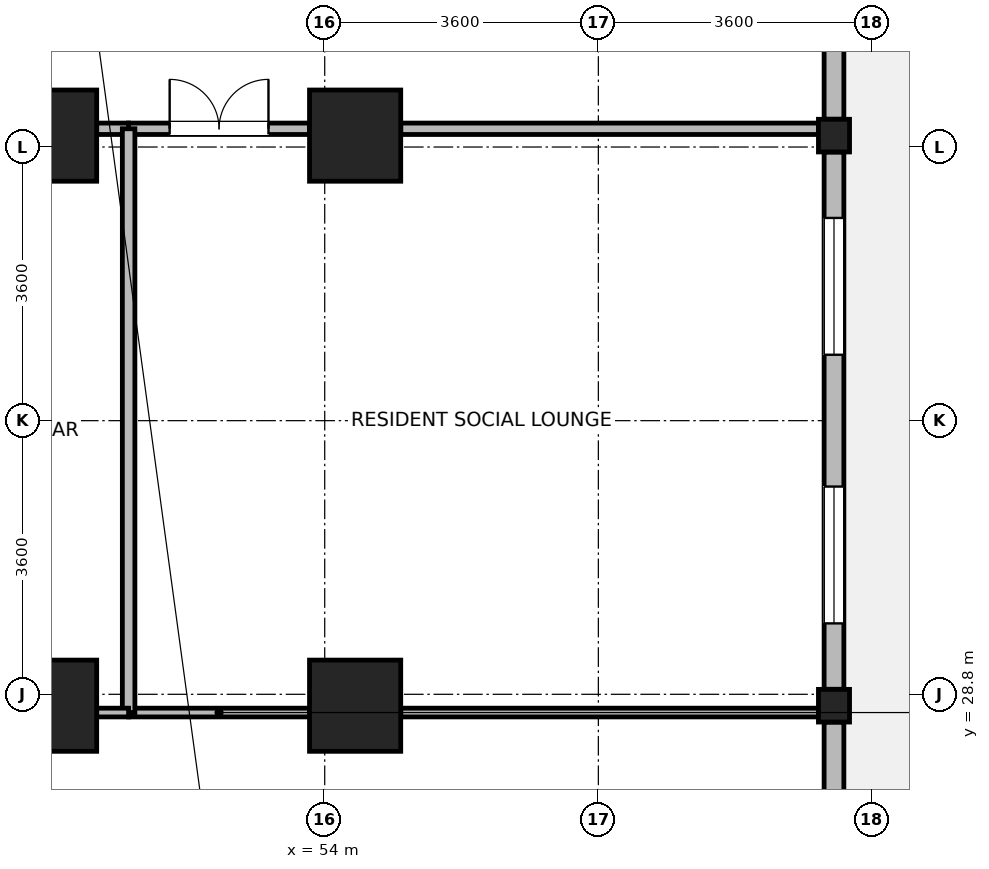
"""IFC4 building model, lengths in metres.
Left out: names, types, materials, properties, quantities, classifications, styles, units other than length and angle.
Written with IfcOpenShell. Run it as: python <this file> out.ifc"""

import sys

from ifc_helpers import new_model, si_unit, direction, frame, frame_2d, origin, origin_2d, place, context, subcontext, project, spatial, rectangle, i_section, extrude, source, transform, mapped, element, fill, save


model = new_model("IFC4")
c1 = context("Model", 3, precision=1e-05, world=origin(), true_north=direction((0.0, 1.0)))
c2 = subcontext(c1, "Body", "Model", "MODEL_VIEW")
j1 = project(units=[si_unit("LENGTHUNIT", "METRE"), si_unit("PLANEANGLEUNIT", "RADIAN")], contexts=[c1])
p1 = place(None, origin())
s1 = spatial("IfcSite", under=j1, at=p1, CompositionType="ELEMENT")
p2 = place(p1, origin())
s2 = spatial("IfcBuilding", under=s1, at=p2, CompositionType="ELEMENT")
p3 = place(p2, frame((0.0, 0.0, 78.6)))
s3 = spatial("IfcBuildingStorey", under=s2, at=p3, CompositionType="ELEMENT", Elevation=78.6)
m1 = source(origin(), c2, "Body", "SweptSolid", [
    extrude(rectangle(XDim=1.2, YDim=1.2, at=origin_2d()), origin(), (0.0, 0.0, 1.0), 3.7),
])
for number, where, z_axis, x_axis in (
    (1, (50.4, 28.65, 0.0), (0.0, 0.0, 1.0), (1.0, 0.0, 0.0)),
    (2, (50.4, 36.15, 0.0), (0.0, 0.0, 1.0), (1.0, 0.0, 0.0)),
    (3, (54.4, 28.65, 0.0), (0.0, 0.0, 1.0), (1.0, 0.0, 0.0)),
    (4, (54.4, 36.15, 0.0), (0.0, 0.0, 1.0), (1.0, 0.0, 0.0)),
):
    element("IfcColumn", number, at=place(p3, frame(where, z_axis=z_axis, x_axis=x_axis)), inside=s3, PredefinedType="COLUMN", context=c2, shape_type="MappedRepresentation", body=[
        mapped(m1, transform((0.0, 0.0, 0.0), x_axis=(1.0, 0.0, 0.0), y_axis=(0.0, 1.0, 0.0), z_axis=(0.0, 0.0, 1.0), scale=1.0)),
    ])
m2 = source(origin(), c2, "Body", "SweptSolid", [
    extrude(i_section(OverallWidth=0.409, OverallDepth=0.43, WebThickness=0.024, FlangeThickness=0.033, FilletRadius=0.015, at=origin_2d()), origin(), (0.0, 0.0, 1.0), 3.7),
])
for number, where, z_axis, x_axis in (
    (5, (60.7, 28.65, 0.0), (0.0, 0.0, 1.0), (1.0, 0.0, 0.0)),
    (6, (60.7, 36.15, 0.0), (0.0, 0.0, 1.0), (1.0, 0.0, 0.0)),
):
    element("IfcColumn", number, at=place(p3, frame(where, z_axis=z_axis, x_axis=x_axis)), inside=s3, PredefinedType="COLUMN", context=c2, shape_type="MappedRepresentation", body=[
        mapped(m2, transform((0.0, 0.0, 0.0), x_axis=(1.0, 0.0, 0.0), y_axis=(0.0, 1.0, 0.0), z_axis=(0.0, 0.0, 1.0), scale=1.0)),
    ])
p4 = place(p3, frame((60.7, 28.434, 0.0), z_axis=(0.0, 0.0, 1.0), x_axis=(0.0, -1.0, 0.0)))
e7 = element("IfcWall", 7, at=p4, inside=s3, PredefinedType="STANDARD", context=c2, shape_type="SweptSolid", body=[
    extrude(rectangle(XDim=6.618, YDim=0.26, at=frame_2d((3.309, 0.0))), origin(), (0.0, 0.0, 1.0), 2.93),
])
p5 = place(p4, frame((4.063, 0.0, 0.85)))
e8 = element("IfcOpeningElement", 8, at=p5, cuts=e7, PredefinedType="OPENING", context=c2, shape_type="SweptSolid", body=[
    extrude(rectangle(XDim=1.8, YDim=1.85, at=frame_2d((0.9, 0.925))), frame((0.0, 0.14, 0.0), z_axis=(0.0, -1.0, 0.0), x_axis=(1.0, 0.0, 0.0)), (0.0, 0.0, 1.0), 0.28),
])
p6 = place(p4, frame((2.305, 0.0, 0.85)))
e9 = element("IfcOpeningElement", 9, at=p6, cuts=e7, PredefinedType="OPENING", context=c2, shape_type="SweptSolid", body=[
    extrude(rectangle(XDim=0.95, YDim=1.75, at=frame_2d((0.475, 0.875))), frame((0.0, 0.14, 0.0), z_axis=(0.0, -1.0, 0.0), x_axis=(1.0, 0.0, 0.0)), (0.0, 0.0, 1.0), 0.28),
])
p7 = place(p3, frame((60.7, 35.934, 0.0), z_axis=(0.0, 0.0, 1.0), x_axis=(0.0, -1.0, 0.0)))
e10 = element("IfcWall", 10, at=p7, inside=s3, PredefinedType="STANDARD", context=c2, shape_type="SweptSolid", body=[
    extrude(rectangle(XDim=7.068, YDim=0.26, at=frame_2d((3.534, 0.0))), origin(), (0.0, 0.0, 1.0), 2.93),
])
p8 = place(p7, frame((0.867, 0.0, 0.85)))
e11 = element("IfcOpeningElement", 11, at=p8, cuts=e10, PredefinedType="OPENING", context=c2, shape_type="SweptSolid", body=[
    extrude(rectangle(XDim=1.8, YDim=1.85, at=frame_2d((0.9, 0.925))), frame((0.0, 0.14, 0.0), z_axis=(0.0, -1.0, 0.0), x_axis=(1.0, 0.0, 0.0)), (0.0, 0.0, 1.0), 0.28),
])
p9 = place(p7, frame((4.401, 0.0, 0.85)))
e12 = element("IfcOpeningElement", 12, at=p9, cuts=e10, PredefinedType="OPENING", context=c2, shape_type="SweptSolid", body=[
    extrude(rectangle(XDim=1.8, YDim=1.85, at=frame_2d((0.9, 0.925))), frame((0.0, 0.14, 0.0), z_axis=(0.0, -1.0, 0.0), x_axis=(1.0, 0.0, 0.0)), (0.0, 0.0, 1.0), 0.28),
])
p10 = place(p3, frame((60.7, 43.33, 0.0), z_axis=(0.0, 0.0, 1.0), x_axis=(0.0, -1.0, 0.0)))
e13 = element("IfcWall", 13, at=p10, inside=s3, PredefinedType="STANDARD", context=c2, shape_type="SweptSolid", body=[
    extrude(rectangle(XDim=6.964, YDim=0.26, at=frame_2d((3.482, 0.0))), origin(), (0.0, 0.0, 1.0), 3.43),
])
p11 = place(p10, frame((0.391, 0.0, 0.85)))
e14 = element("IfcOpeningElement", 14, at=p11, cuts=e13, PredefinedType="OPENING", context=c2, shape_type="SweptSolid", body=[
    extrude(rectangle(XDim=2.7, YDim=2.05, at=frame_2d((1.35, 1.025))), frame((0.0, 0.14, 0.0), z_axis=(0.0, -1.0, 0.0), x_axis=(1.0, 0.0, 0.0)), (0.0, 0.0, 1.0), 0.28),
])
p12 = place(p10, frame((3.564, 0.0, 0.85)))
e15 = element("IfcOpeningElement", 15, at=p12, cuts=e13, PredefinedType="OPENING", context=c2, shape_type="SweptSolid", body=[
    extrude(rectangle(XDim=0.95, YDim=1.75, at=frame_2d((0.475, 0.875))), frame((0.0, 0.14, 0.0), z_axis=(0.0, -1.0, 0.0), x_axis=(1.0, 0.0, 0.0)), (0.0, 0.0, 1.0), 0.28),
])
p13 = place(p3, frame((51.42, 36.24, 0.0), z_axis=(0.0, 0.0, 1.0), x_axis=(1.0, 0.0, 0.0)))
e16 = element("IfcWall", 16, at=p13, inside=s3, PredefinedType="PARTITIONING", context=c2, shape_type="SweptSolid", body=[
    extrude(rectangle(XDim=2.38, YDim=0.15, at=frame_2d((1.19, 0.0))), origin(), (0.0, 0.0, 1.0), 2.78),
])
p14 = place(p13, frame((0.54, 0.0, 0.0)))
e17 = element("IfcOpeningElement", 17, at=p14, cuts=e16, PredefinedType="OPENING", context=c2, shape_type="SweptSolid", body=[
    extrude(rectangle(XDim=1.3, YDim=2.12, at=frame_2d((0.65, 1.06))), frame((0.0, 0.085, 0.0), z_axis=(0.0, -1.0, 0.0), x_axis=(1.0, 0.0, 0.0)), (0.0, 0.0, 1.0), 0.17),
])
p15 = place(p3, frame((55.0, 36.24, 0.0), z_axis=(0.0, 0.0, 1.0), x_axis=(1.0, 0.0, 0.0)))
e18 = element("IfcWall", 18, at=p15, inside=s3, PredefinedType="PARTITIONING", context=c2, shape_type="SweptSolid", body=[
    extrude(rectangle(XDim=5.496, YDim=0.15, at=frame_2d((2.748, 0.0))), origin(), (0.0, 0.0, 1.0), 2.78),
])
p16 = place(p3, frame((51.0, 36.24, 0.0), z_axis=(0.0, 0.0, 1.0), x_axis=(1.0, 0.0, 0.0)))
e19 = element("IfcWall", 19, at=p16, inside=s3, PredefinedType="PARTITIONING", context=c2, shape_type="SweptSolid", body=[
    extrude(rectangle(XDim=0.42, YDim=0.15, at=frame_2d((0.21, 0.0))), origin(), (0.0, 0.0, 1.0), 2.78),
])
p17 = place(p3, frame((51.42, 28.56, 0.0), z_axis=(0.0, 0.0, 1.0), x_axis=(1.0, 0.0, 0.0)))
e20 = element("IfcWall", 20, at=p17, inside=s3, PredefinedType="PARTITIONING", context=c2, shape_type="SweptSolid", body=[
    extrude(rectangle(XDim=2.38, YDim=0.115, at=frame_2d((1.19, 0.0))), origin(), (0.0, 0.0, 1.0), 2.78),
])
p18 = place(p3, frame((55.0, 28.56, 0.0), z_axis=(0.0, 0.0, 1.0), x_axis=(1.0, 0.0, 0.0)))
e21 = element("IfcWall", 21, at=p18, inside=s3, PredefinedType="PARTITIONING", context=c2, shape_type="SweptSolid", body=[
    extrude(rectangle(XDim=5.496, YDim=0.115, at=frame_2d((2.748, 0.0))), origin(), (0.0, 0.0, 1.0), 2.78),
])
p19 = place(p3, frame((51.42, 28.56, 0.0), z_axis=(0.0, 0.0, 1.0), x_axis=(0.0, 1.0, 0.0)))
e22 = element("IfcWall", 22, at=p19, inside=s3, PredefinedType="PARTITIONING", context=c2, shape_type="SweptSolid", body=[
    extrude(rectangle(XDim=7.68, YDim=0.165, at=frame_2d((3.84, 0.0))), origin(), (0.0, 0.0, 1.0), 3.43),
])
p20 = place(p3, frame((51.0, 28.56, 0.0), z_axis=(0.0, 0.0, 1.0), x_axis=(1.0, 0.0, 0.0)))
e23 = element("IfcWall", 23, at=p20, inside=s3, PredefinedType="PARTITIONING", context=c2, shape_type="SweptSolid", body=[
    extrude(rectangle(XDim=0.42, YDim=0.115, at=frame_2d((0.21, 0.0))), origin(), (0.0, 0.0, 1.0), 2.78),
])
p21 = place(p8, origin())
e24 = element("IfcWindow", 24, at=p21, inside=s3, PartitioningType="SINGLE_PANEL", PredefinedType="WINDOW", context=c2, shape_type="SweptSolid", body=[
    extrude(rectangle(XDim=1.8, YDim=1.85, at=frame_2d((0.9, 0.925))), frame((0.0, 0.03, 0.0), z_axis=(0.0, -1.0, 0.0), x_axis=(1.0, 0.0, 0.0)), (0.0, 0.0, 1.0), 0.06),
])
fill(e11, e24)
p22 = place(p9, origin())
e25 = element("IfcWindow", 25, at=p22, inside=s3, PartitioningType="SINGLE_PANEL", PredefinedType="WINDOW", context=c2, shape_type="SweptSolid", body=[
    extrude(rectangle(XDim=1.8, YDim=1.85, at=frame_2d((0.9, 0.925))), frame((0.0, 0.03, 0.0), z_axis=(0.0, -1.0, 0.0), x_axis=(1.0, 0.0, 0.0)), (0.0, 0.0, 1.0), 0.06),
])
fill(e12, e25)
p23 = place(p14, origin())
e26 = element("IfcDoor", 26, at=p23, inside=s3, OperationType="DOUBLE_DOOR_SINGLE_SWING", PredefinedType="DOOR", context=c2, shape_type="SweptSolid", body=[
    extrude(rectangle(XDim=1.3, YDim=2.12, at=frame_2d((0.65, 1.06))), frame((0.0, 0.025, 0.0), z_axis=(0.0, -1.0, 0.0), x_axis=(1.0, 0.0, 0.0)), (0.0, 0.0, 1.0), 0.05),
])
fill(e17, e26)
save(model, sys.argv[1])
